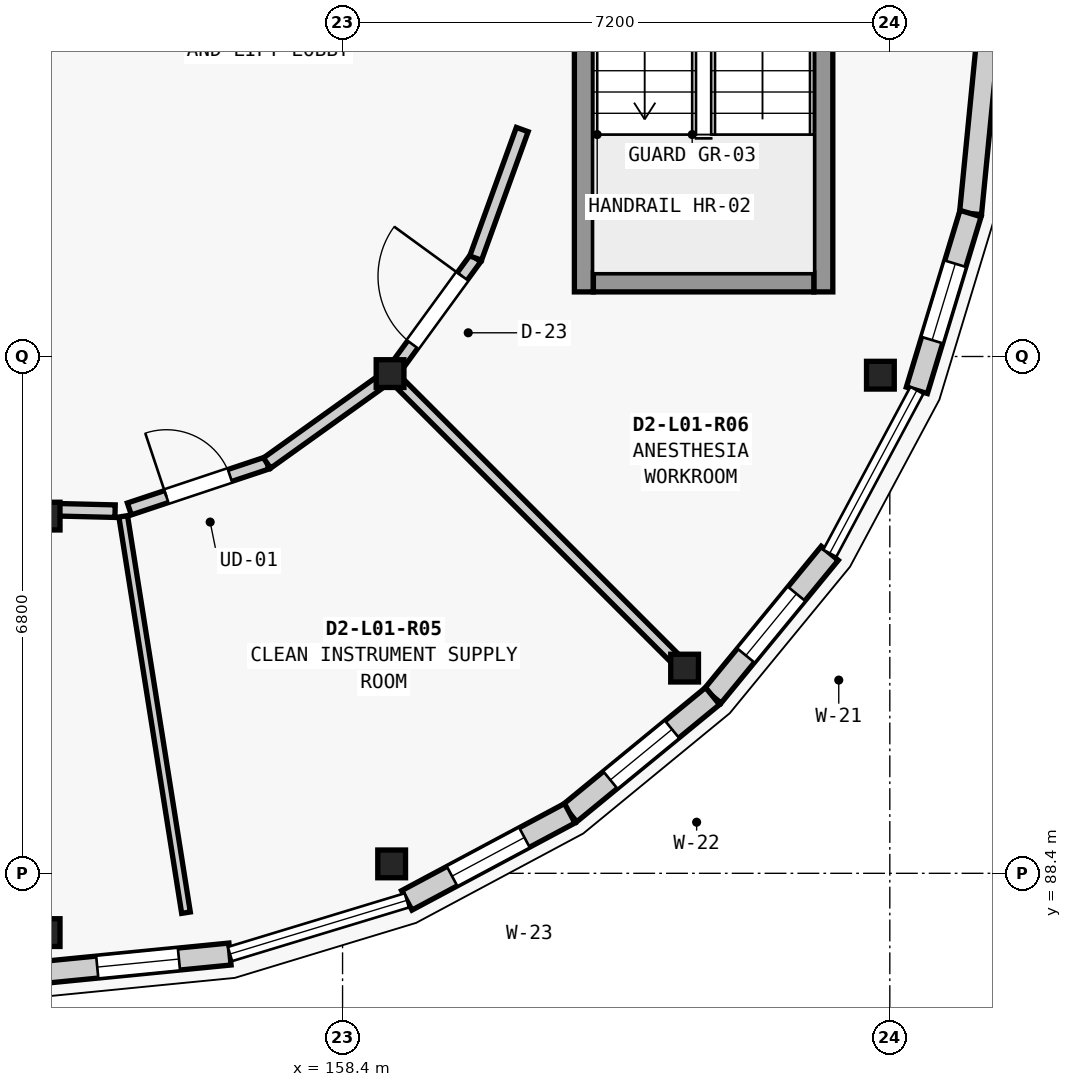
"""IFC4 building model, lengths in metres.
Left out: names, types, materials, properties, quantities, classifications, styles, units other than length and angle.
Written with IfcOpenShell. Run it as: python <this file> out.ifc"""

import sys

from ifc_helpers import new_model, si_unit, direction, frame, frame_2d, origin, origin_2d, place, context, subcontext, project, spatial, rectangle, extrude, element, fill, save


model = new_model("IFC4")
c1 = context("Model", 3, precision=1e-05, world=origin(), true_north=direction((0.0, 1.0)))
c2 = subcontext(c1, "Body", "Model", "MODEL_VIEW")
j1 = project(units=[si_unit("LENGTHUNIT", "METRE"), si_unit("PLANEANGLEUNIT", "RADIAN")], contexts=[c1])
p1 = place(None, origin())
s1 = spatial("IfcSite", under=j1, at=p1, CompositionType="ELEMENT")
p2 = place(p1, origin())
s2 = spatial("IfcBuilding", under=s1, at=p2, CompositionType="ELEMENT")
p3 = place(p2, frame((0.0, 0.0, 4.55)))
s3 = spatial("IfcBuildingStorey", under=s2, at=p3, CompositionType="ELEMENT", Elevation=4.55)
for number, where, z_axis, x_axis in (
    (1, (154.5, 87.62, 0.0), (0.0, 0.0, 1.0), (1.0, 0.0, 0.0)),
    (2, (159.046, 88.524, 0.0), (0.0, 0.0, 1.0), (1.0, 0.0, 0.0)),
    (3, (162.9, 91.1, 0.0), (0.0, 0.0, 1.0), (1.0, 0.0, 0.0)),
    (4, (165.476, 94.954, 0.0), (0.0, 0.0, 1.0), (1.0, 0.0, 0.0)),
    (5, (154.5, 93.1, 0.0), (0.0, 0.0, 1.0), (1.0, 0.0, 0.0)),
    (6, (159.025, 94.975, 0.0), (0.0, 0.0, 1.0), (1.0, 0.0, 0.0)),
):
    element("IfcColumn", number, at=place(p3, frame(where, z_axis=z_axis, x_axis=x_axis)), inside=s3, PredefinedType="COLUMN", context=c2, shape_type="SweptSolid", body=[
        extrude(rectangle(XDim=0.365, YDim=0.365, at=origin_2d()), origin(), (0.0, 0.0, 1.0), 4.2),
    ])
p4 = place(p3, frame((166.9, 99.5, 0.0), z_axis=(0.0, 0.0, 1.0), x_axis=(-0.097832820839, -0.995202863323, 0.0)))
e7 = element("IfcWall", 7, at=p4, inside=s3, PredefinedType="ELEMENTEDWALL", context=c2, shape_type="SweptSolid", body=[
    extrude(rectangle(XDim=2.431, YDim=0.29, at=frame_2d((1.215, 0.0))), origin(), (0.0, 0.0, 1.0), 3.309),
])
p5 = place(p3, frame((166.662, 97.081, 0.0), z_axis=(0.0, 0.0, 1.0), x_axis=(-0.290442193951, -0.956892539407, 0.0)))
e8 = element("IfcWall", 8, at=p5, inside=s3, PredefinedType="ELEMENTEDWALL", context=c2, shape_type="SweptSolid", body=[
    extrude(rectangle(XDim=2.431, YDim=0.29, at=frame_2d((1.215, 0.0))), origin(), (0.0, 0.0, 1.0), 3.309),
])
p6 = place(p5, frame((0.69, 0.0, 0.85)))
e9 = element("IfcOpeningElement", 9, at=p6, cuts=e8, PredefinedType="OPENING", context=c2, shape_type="SweptSolid", body=[
    extrude(rectangle(XDim=1.05, YDim=1.6, at=frame_2d((0.525, 0.8))), frame((0.0, 0.155, 0.0), z_axis=(0.0, -1.0, 0.0), x_axis=(1.0, 0.0, 0.0)), (0.0, 0.0, 1.0), 0.31),
])
p7 = place(p3, frame((164.81, 92.611, 0.0), z_axis=(0.0, 0.0, 1.0), x_axis=(-0.634347392822, -0.773048113134, 0.0)))
e10 = element("IfcWall", 10, at=p7, inside=s3, PredefinedType="ELEMENTEDWALL", context=c2, shape_type="SweptSolid", body=[
    extrude(rectangle(XDim=2.431, YDim=0.29, at=frame_2d((1.215, 0.0))), origin(), (0.0, 0.0, 1.0), 3.309),
])
p8 = place(p7, frame((0.69, 0.0, 0.85)))
e11 = element("IfcOpeningElement", 11, at=p8, cuts=e10, PredefinedType="OPENING", context=c2, shape_type="SweptSolid", body=[
    extrude(rectangle(XDim=1.05, YDim=1.9, at=frame_2d((0.525, 0.95))), frame((0.0, 0.155, 0.0), z_axis=(0.0, -1.0, 0.0), x_axis=(1.0, 0.0, 0.0)), (0.0, 0.0, 1.0), 0.31),
])
p9 = place(p3, frame((163.268, 90.732, 0.0), z_axis=(0.0, 0.0, 1.0), x_axis=(-0.773048113134, -0.634347392822, 0.0)))
e12 = element("IfcWall", 12, at=p9, inside=s3, PredefinedType="ELEMENTEDWALL", context=c2, shape_type="SweptSolid", body=[
    extrude(rectangle(XDim=2.431, YDim=0.29, at=frame_2d((1.215, 0.0))), origin(), (0.0, 0.0, 1.0), 3.309),
])
p10 = place(p9, frame((0.69, 0.0, 0.85)))
e13 = element("IfcOpeningElement", 13, at=p10, cuts=e12, PredefinedType="OPENING", context=c2, shape_type="SweptSolid", body=[
    extrude(rectangle(XDim=1.05, YDim=2.15, at=frame_2d((0.525, 1.075))), frame((0.0, 0.155, 0.0), z_axis=(0.0, -1.0, 0.0), x_axis=(1.0, 0.0, 0.0)), (0.0, 0.0, 1.0), 0.31),
])
p11 = place(p3, frame((161.389, 89.19, 0.0), z_axis=(0.0, 0.0, 1.0), x_axis=(-0.881902152415, -0.471432490996, 0.0)))
e14 = element("IfcWall", 14, at=p11, inside=s3, PredefinedType="ELEMENTEDWALL", context=c2, shape_type="SweptSolid", body=[
    extrude(rectangle(XDim=2.431, YDim=0.29, at=frame_2d((1.215, 0.0))), origin(), (0.0, 0.0, 1.0), 3.309),
])
p12 = place(p11, frame((0.676, 0.0, 0.85)))
e15 = element("IfcOpeningElement", 15, at=p12, cuts=e14, PredefinedType="OPENING", context=c2, shape_type="SweptSolid", body=[
    extrude(rectangle(XDim=1.08, YDim=1.5, at=frame_2d((0.54, 0.75))), frame((0.0, 0.155, 0.0), z_axis=(0.0, -1.0, 0.0), x_axis=(1.0, 0.0, 0.0)), (0.0, 0.0, 1.0), 0.31),
])
p13 = place(p3, frame((156.919, 87.338, 0.0), z_axis=(0.0, 0.0, 1.0), x_axis=(-0.995202863323, -0.097832820839, 0.0)))
e16 = element("IfcWall", 16, at=p13, inside=s3, PredefinedType="ELEMENTEDWALL", context=c2, shape_type="SweptSolid", body=[
    extrude(rectangle(XDim=2.431, YDim=0.29, at=frame_2d((1.215, 0.0))), origin(), (0.0, 0.0, 1.0), 3.309),
])
p14 = place(p13, frame((0.675, 0.0, 0.85)))
e17 = element("IfcOpeningElement", 17, at=p14, cuts=e16, PredefinedType="OPENING", context=c2, shape_type="SweptSolid", body=[
    extrude(rectangle(XDim=1.08, YDim=1.8, at=frame_2d((0.54, 0.9))), frame((0.0, 0.155, 0.0), z_axis=(0.0, -1.0, 0.0), x_axis=(1.0, 0.0, 0.0)), (0.0, 0.0, 1.0), 0.31),
])
p15 = place(p3, frame((161.575, 102.95, 0.0), z_axis=(0.0, 0.0, 1.0), x_axis=(0.0, -1.0, 0.0)))
e18 = element("IfcWall", 18, at=p15, inside=s3, PredefinedType="SHEAR", context=c2, shape_type="SweptSolid", body=[
    extrude(rectangle(XDim=6.9, YDim=0.25, at=frame_2d((3.45, 0.0))), origin(), (0.0, 0.0, 1.0), 3.955),
])
p16 = place(p15, frame((0.43, 0.0, 0.0)))
e19 = element("IfcOpeningElement", 19, at=p16, cuts=e18, PredefinedType="OPENING", context=c2, shape_type="SweptSolid", body=[
    extrude(rectangle(XDim=1.1, YDim=2.15, at=frame_2d((0.55, 1.075))), frame((0.0, 0.135, 0.0), z_axis=(0.0, -1.0, 0.0), x_axis=(1.0, 0.0, 0.0)), (0.0, 0.0, 1.0), 0.27),
])
p17 = place(p3, frame((164.725, 102.95, 0.0), z_axis=(0.0, 0.0, 1.0), x_axis=(0.0, -1.0, 0.0)))
e20 = element("IfcWall", 20, at=p17, inside=s3, PredefinedType="SHEAR", context=c2, shape_type="SweptSolid", body=[
    extrude(rectangle(XDim=6.9, YDim=0.25, at=frame_2d((3.45, 0.0))), origin(), (0.0, 0.0, 1.0), 3.955),
])
p18 = place(p3, frame((161.7, 96.175, 0.0), z_axis=(0.0, 0.0, 1.0), x_axis=(1.0, 0.0, 0.0)))
e21 = element("IfcWall", 21, at=p18, inside=s3, PredefinedType="SHEAR", context=c2, shape_type="SweptSolid", body=[
    extrude(rectangle(XDim=2.9, YDim=0.25, at=frame_2d((1.45, 0.0))), origin(), (0.0, 0.0, 1.0), 3.955),
])
p19 = place(p3, frame((155.514, 93.097, 0.0), z_axis=(0.0, 0.0, 1.0), x_axis=(0.156475439167, -0.98768185006, 0.0)))
e22 = element("IfcWall", 22, at=p19, inside=s3, PredefinedType="PARTITIONING", context=c2, shape_type="SweptSolid", body=[
    extrude(rectangle(XDim=5.28, YDim=0.115, at=frame_2d((2.64, 0.0))), origin(), (0.0, 0.0, 1.0), 3.284),
])
p20 = place(p3, frame((159.084, 94.916, 0.0), z_axis=(0.0, 0.0, 1.0), x_axis=(0.707106781187, -0.707106781187, 0.0)))
e23 = element("IfcWall", 23, at=p20, inside=s3, PredefinedType="PARTITIONING", context=c2, shape_type="SweptSolid", body=[
    extrude(rectangle(XDim=5.316, YDim=0.145, at=frame_2d((2.658, 0.0))), origin(), (0.0, 0.0, 1.0), 3.284),
])
p21 = place(p3, frame((154.668, 93.183, 0.0), z_axis=(0.0, 0.0, 1.0), x_axis=(0.999701314602, -0.024439344989, 0.0)))
e24 = element("IfcWall", 24, at=p21, inside=s3, PredefinedType="PARTITIONING", context=c2, shape_type="SweptSolid", body=[
    extrude(rectangle(XDim=0.739, YDim=0.165, at=frame_2d((0.37, 0.0))), origin(), (0.0, 0.0, 1.0), 3.284),
])
p22 = place(p3, frame((155.595, 93.194, 0.0), z_axis=(0.0, 0.0, 1.0), x_axis=(0.948632132652, 0.316381220839, 0.0)))
e25 = element("IfcWall", 25, at=p22, inside=s3, PredefinedType="PARTITIONING", context=c2, shape_type="SweptSolid", body=[
    extrude(rectangle(XDim=1.909, YDim=0.165, at=frame_2d((0.955, 0.0))), origin(), (0.0, 0.0, 1.0), 3.284),
])
p23 = place(p22, frame((0.514, 0.0, 0.0)))
e26 = element("IfcOpeningElement", 26, at=p23, cuts=e25, PredefinedType="OPENING", context=c2, shape_type="SweptSolid", body=[
    extrude(rectangle(XDim=0.88, YDim=2.1, at=frame_2d((0.44, 1.05))), frame((0.0, 0.093, 0.0), z_axis=(0.0, -1.0, 0.0), x_axis=(1.0, 0.0, 0.0)), (0.0, 0.0, 1.0), 0.185),
])
p24 = place(p3, frame((157.406, 93.798, 0.0), z_axis=(0.0, 0.0, 1.0), x_axis=(0.813324248, 0.581810680218, 0.0)))
e27 = element("IfcWall", 27, at=p24, inside=s3, PredefinedType="PARTITIONING", context=c2, shape_type="SweptSolid", body=[
    extrude(rectangle(XDim=1.815, YDim=0.165, at=frame_2d((0.907, 0.0))), origin(), (0.0, 0.0, 1.0), 3.284),
])
p25 = place(p3, frame((159.147, 95.117, 0.0), z_axis=(0.0, 0.0, 1.0), x_axis=(0.588784523438, 0.808290037647, 0.0)))
e28 = element("IfcWall", 28, at=p25, inside=s3, PredefinedType="PARTITIONING", context=c2, shape_type="SweptSolid", body=[
    extrude(rectangle(XDim=1.705, YDim=0.165, at=frame_2d((0.853, 0.0))), origin(), (0.0, 0.0, 1.0), 3.284),
])
p26 = place(p25, frame((0.298, 0.0, 0.0)))
e29 = element("IfcOpeningElement", 29, at=p26, cuts=e28, PredefinedType="OPENING", context=c2, shape_type="SweptSolid", body=[
    extrude(rectangle(XDim=1.11, YDim=2.25, at=frame_2d((0.555, 1.125))), frame((0.0, 0.093, 0.0), z_axis=(0.0, -1.0, 0.0), x_axis=(1.0, 0.0, 0.0)), (0.0, 0.0, 1.0), 0.185),
])
p27 = place(p3, frame((160.151, 96.495, 0.0), z_axis=(0.0, 0.0, 1.0), x_axis=(0.340838314518, 0.940121930048, 0.0)))
e30 = element("IfcWall", 30, at=p27, inside=s3, PredefinedType="PARTITIONING", context=c2, shape_type="SweptSolid", body=[
    extrude(rectangle(XDim=1.799, YDim=0.165, at=frame_2d((0.899, 0.0))), origin(), (0.0, 0.0, 1.0), 3.284),
])
p28 = place(p6, origin())
e31 = element("IfcWindow", 31, at=p28, inside=s3, PartitioningType="SINGLE_PANEL", PredefinedType="WINDOW", context=c2, shape_type="SweptSolid", body=[
    extrude(rectangle(XDim=1.05, YDim=1.6, at=frame_2d((0.525, 0.8))), frame((0.0, 0.03, 0.0), z_axis=(0.0, -1.0, 0.0), x_axis=(1.0, 0.0, 0.0)), (0.0, 0.0, 1.0), 0.06),
])
fill(e9, e31)
p29 = place(p8, origin())
e32 = element("IfcWindow", 32, at=p29, inside=s3, PartitioningType="SINGLE_PANEL", PredefinedType="WINDOW", context=c2, shape_type="SweptSolid", body=[
    extrude(rectangle(XDim=1.05, YDim=1.9, at=frame_2d((0.525, 0.95))), frame((0.0, 0.03, 0.0), z_axis=(0.0, -1.0, 0.0), x_axis=(1.0, 0.0, 0.0)), (0.0, 0.0, 1.0), 0.06),
])
fill(e11, e32)
p30 = place(p10, origin())
e33 = element("IfcWindow", 33, at=p30, inside=s3, PartitioningType="SINGLE_PANEL", PredefinedType="WINDOW", context=c2, shape_type="SweptSolid", body=[
    extrude(rectangle(XDim=1.05, YDim=2.15, at=frame_2d((0.525, 1.075))), frame((0.0, 0.03, 0.0), z_axis=(0.0, -1.0, 0.0), x_axis=(1.0, 0.0, 0.0)), (0.0, 0.0, 1.0), 0.06),
])
fill(e13, e33)
p31 = place(p12, origin())
e34 = element("IfcWindow", 34, at=p31, inside=s3, PartitioningType="SINGLE_PANEL", PredefinedType="WINDOW", context=c2, shape_type="SweptSolid", body=[
    extrude(rectangle(XDim=1.08, YDim=1.5, at=frame_2d((0.54, 0.75))), frame((0.0, 0.03, 0.0), z_axis=(0.0, -1.0, 0.0), x_axis=(1.0, 0.0, 0.0)), (0.0, 0.0, 1.0), 0.06),
])
fill(e15, e34)
p32 = place(p14, origin())
e35 = element("IfcWindow", 35, at=p32, inside=s3, PartitioningType="SINGLE_PANEL", PredefinedType="WINDOW", context=c2, shape_type="SweptSolid", body=[
    extrude(rectangle(XDim=1.08, YDim=1.8, at=frame_2d((0.54, 0.9))), frame((0.0, 0.03, 0.0), z_axis=(0.0, -1.0, 0.0), x_axis=(1.0, 0.0, 0.0)), (0.0, 0.0, 1.0), 0.06),
])
fill(e17, e35)
p33 = place(p23, origin())
e36 = element("IfcDoor", 36, at=p33, inside=s3, OperationType="SINGLE_SWING_LEFT", PredefinedType="DOOR", context=c2, shape_type="SweptSolid", body=[
    extrude(rectangle(XDim=0.88, YDim=2.1, at=frame_2d((0.44, 1.05))), frame((0.0, 0.025, 0.0), z_axis=(0.0, -1.0, 0.0), x_axis=(1.0, 0.0, 0.0)), (0.0, 0.0, 1.0), 0.05),
])
fill(e26, e36)
p34 = place(p26, origin())
e37 = element("IfcDoor", 37, at=p34, inside=s3, OperationType="SINGLE_SWING_RIGHT", PredefinedType="DOOR", context=c2, shape_type="SweptSolid", body=[
    extrude(rectangle(XDim=1.11, YDim=2.25, at=frame_2d((0.555, 1.125))), frame((0.0, 0.025, 0.0), z_axis=(0.0, -1.0, 0.0), x_axis=(1.0, 0.0, 0.0)), (0.0, 0.0, 1.0), 0.05),
])
fill(e29, e37)
save(model, sys.argv[1])
